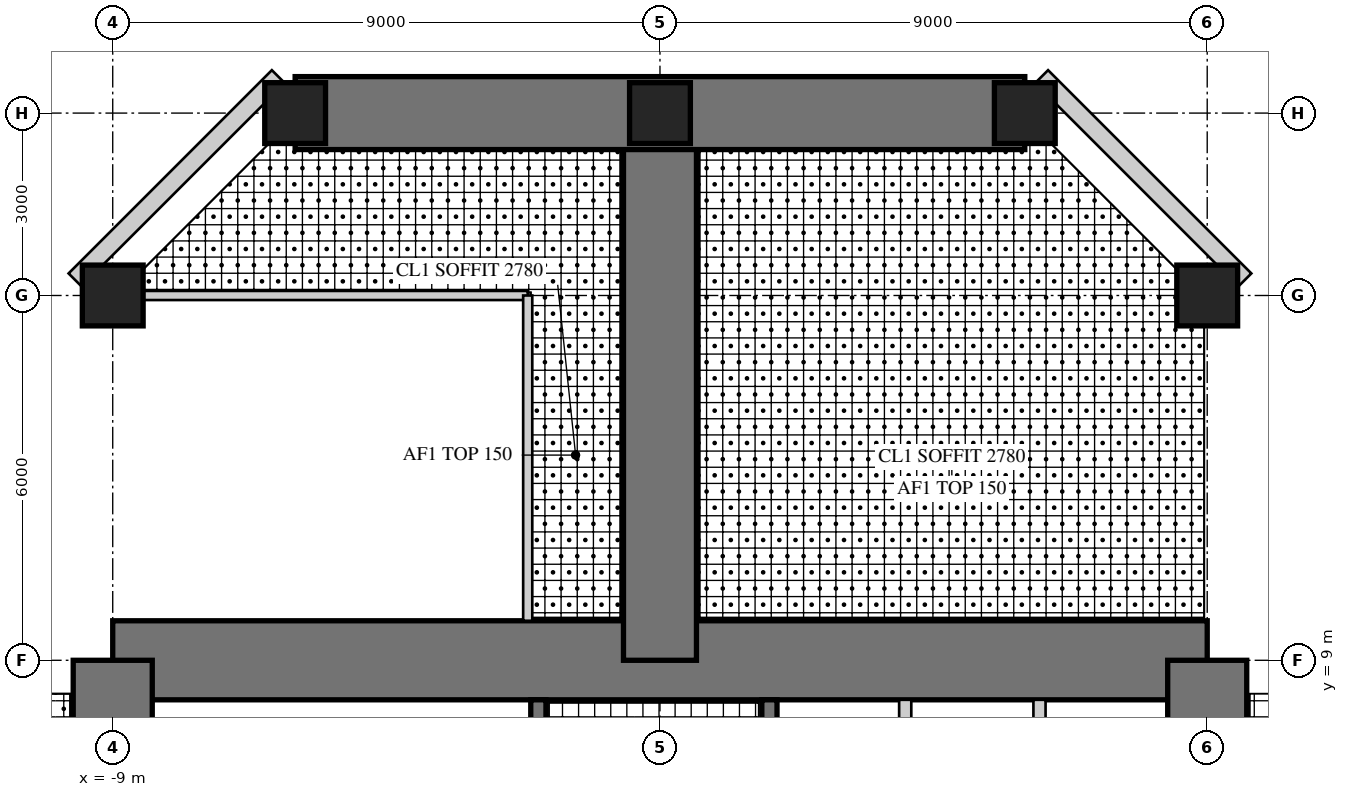
"""IFC4 building model, lengths in metres.
Left out: names, types, materials, properties, quantities, classifications, styles, units other than length and angle.
Written with IfcOpenShell. Run it as: python <this file> out.ifc"""

import sys

from ifc_helpers import new_model, si_unit, direction, frame, frame_2d, origin, origin_2d, place, context, subcontext, project, spatial, rectangle, hollow_rectangle, extrude, element, fill, save


model = new_model("IFC4")
c1 = context("Model", 3, precision=1e-05, world=origin(), true_north=direction((0.0, 1.0)))
c2 = subcontext(c1, "Body", "Model", "MODEL_VIEW")
j1 = project(units=[si_unit("LENGTHUNIT", "METRE"), si_unit("PLANEANGLEUNIT", "RADIAN")], contexts=[c1])
p1 = place(None, origin())
s1 = spatial("IfcSite", under=j1, at=p1, CompositionType="ELEMENT")
p2 = place(p1, origin())
s2 = spatial("IfcBuilding", under=s1, at=p2, CompositionType="ELEMENT")
p3 = place(p2, frame((0.0, 0.0, 124.5)))
s3 = spatial("IfcBuildingStorey", under=s2, at=p3, CompositionType="ELEMENT", Elevation=124.5)
p4 = place(p3, frame((9.0, 9.0, 0.0), z_axis=(0.0, 0.0, 1.0), x_axis=(-1.0, 0.0, 0.0)))
e1 = element("IfcWall", 1, at=p4, inside=s3, PredefinedType="SHEAR", context=c2, shape_type="SweptSolid", body=[
    extrude(rectangle(XDim=18.0, YDim=1.3, at=frame_2d((9.0, 0.0))), origin(), (0.0, 0.0, 1.0), 4.0),
])
p5 = place(p4, frame((9.8, 0.0, 0.0)))
e2 = element("IfcOpeningElement", 2, at=p5, cuts=e1, PredefinedType="OPENING", context=c2, shape_type="SweptSolid", body=[
    extrude(rectangle(XDim=1.0, YDim=2.4, at=frame_2d((0.5, 1.2))), frame((0.0, 0.66, 0.0), z_axis=(0.0, -1.0, 0.0), x_axis=(1.0, 0.0, 0.0)), (0.0, 0.0, 1.0), 1.32),
])
p6 = place(p3, frame((9.0, -9.0, 0.0), z_axis=(0.0, 0.0, 1.0), x_axis=(0.0, 1.0, 0.0)))
e3 = element("IfcWall", 3, at=p6, inside=s3, PredefinedType="SHEAR", context=c2, shape_type="SweptSolid", body=[
    extrude(rectangle(XDim=18.0, YDim=1.3, at=frame_2d((9.0, 0.0))), origin(), (0.0, 0.0, 1.0), 4.0),
])
p7 = place(p6, frame((9.8, 0.0, 0.0)))
e4 = element("IfcOpeningElement", 4, at=p7, cuts=e3, PredefinedType="OPENING", context=c2, shape_type="SweptSolid", body=[
    extrude(rectangle(XDim=1.0, YDim=2.4, at=frame_2d((0.5, 1.2))), frame((0.0, 0.66, 0.0), z_axis=(0.0, -1.0, 0.0), x_axis=(1.0, 0.0, 0.0)), (0.0, 0.0, 1.0), 1.32),
])
p8 = place(p3, frame((-9.0, 9.0, 0.0), z_axis=(0.0, 0.0, 1.0), x_axis=(0.0, -1.0, 0.0)))
e5 = element("IfcWall", 5, at=p8, inside=s3, PredefinedType="SHEAR", context=c2, shape_type="SweptSolid", body=[
    extrude(rectangle(XDim=18.0, YDim=1.3, at=frame_2d((9.0, 0.0))), origin(), (0.0, 0.0, 1.0), 4.0),
])
p9 = place(p8, frame((9.8, 0.0, 0.0)))
e6 = element("IfcOpeningElement", 6, at=p9, cuts=e5, PredefinedType="OPENING", context=c2, shape_type="SweptSolid", body=[
    extrude(rectangle(XDim=1.0, YDim=2.4, at=frame_2d((0.5, 1.2))), frame((0.0, 0.66, 0.0), z_axis=(0.0, -1.0, 0.0), x_axis=(1.0, 0.0, 0.0)), (0.0, 0.0, 1.0), 1.32),
])
p10 = place(p3, frame((1.8, 1.875, 0.0), z_axis=(0.0, 0.0, 1.0), x_axis=(0.0, 1.0, 0.0)))
e7 = element("IfcWall", 7, at=p10, inside=s3, PredefinedType="SHEAR", context=c2, shape_type="SweptSolid", body=[
    extrude(rectangle(XDim=6.475, YDim=0.25, at=frame_2d((3.238, 0.0))), origin(), (0.0, 0.0, 1.0), 4.0),
])
p11 = place(p10, frame((1.875, 0.0, 0.0)))
e8 = element("IfcOpeningElement", 8, at=p11, cuts=e7, PredefinedType="OPENING", context=c2, shape_type="SweptSolid", body=[
    extrude(rectangle(XDim=1.6, YDim=2.4, at=frame_2d((0.8, 1.2))), frame((0.0, 0.135, 0.0), z_axis=(0.0, -1.0, 0.0), x_axis=(1.0, 0.0, 0.0)), (0.0, 0.0, 1.0), 0.27),
])
for number, where, z_axis, x_axis in (
    (9, (4.033, 5.975, 0.0), (0.0, 0.0, 1.0), (0.0, 1.0, 0.0)),
    (10, (6.242, 5.975, 0.0), (0.0, 0.0, 1.0), (0.0, 1.0, 0.0)),
):
    element("IfcWall", number, at=place(p3, frame(where, z_axis=z_axis, x_axis=x_axis)), inside=s3, PredefinedType="PARTITIONING", context=c2, shape_type="SweptSolid", body=[
        extrude(rectangle(XDim=2.375, YDim=0.2, at=frame_2d((1.188, 0.0))), origin(), (0.0, 0.0, 1.0), 4.0),
    ])
p12 = place(p3, frame((-2.0, 1.675, 0.0), z_axis=(0.0, 0.0, 1.0), x_axis=(0.0, 1.0, 0.0)))
e11 = element("IfcWall", 11, at=p12, inside=s3, PredefinedType="SHEAR", context=c2, shape_type="SweptSolid", body=[
    extrude(rectangle(XDim=6.675, YDim=0.25, at=frame_2d((3.337, 0.0))), origin(), (0.0, 0.0, 1.0), 4.0),
])
p13 = place(p12, frame((0.725, 0.0, 0.0)))
e12 = element("IfcOpeningElement", 12, at=p13, cuts=e11, PredefinedType="OPENING", context=c2, shape_type="SweptSolid", body=[
    extrude(rectangle(XDim=1.0, YDim=2.1, at=frame_2d((0.5, 1.05))), frame((0.0, 0.135, 0.0), z_axis=(0.0, -1.0, 0.0), x_axis=(1.0, 0.0, 0.0)), (0.0, 0.0, 1.0), 0.27),
])
p14 = place(p3, frame((0.0, 9.0, 0.0), z_axis=(0.0, 0.0, 1.0), x_axis=(0.0, 1.0, 0.0)))
e13 = element("IfcWall", 13, at=p14, inside=s3, PredefinedType="SHEAR", context=c2, shape_type="SweptSolid", body=[
    extrude(rectangle(XDim=9.0, YDim=1.2, at=frame_2d((4.5, 0.0))), origin(), (0.0, 0.0, 1.0), 4.0),
])
p15 = place(p14, frame((4.3, 0.0, 0.0)))
e14 = element("IfcOpeningElement", 14, at=p15, cuts=e13, PredefinedType="OPENING", context=c2, shape_type="SweptSolid", body=[
    extrude(rectangle(XDim=1.0, YDim=2.2, at=frame_2d((0.5, 1.1))), frame((0.0, 0.61, 0.0), z_axis=(0.0, -1.0, 0.0), x_axis=(1.0, 0.0, 0.0)), (0.0, 0.0, 1.0), 1.22),
])
p16 = place(p3, frame((6.0, 18.0, 0.0), z_axis=(0.0, 0.0, 1.0), x_axis=(-1.0, 0.0, 0.0)))
e15 = element("IfcWall", 15, at=p16, inside=s3, PredefinedType="SHEAR", context=c2, shape_type="SweptSolid", body=[
    extrude(rectangle(XDim=12.0, YDim=1.2, at=frame_2d((6.0, 0.0))), origin(), (0.0, 0.0, 1.0), 4.0),
])
p17 = place(p16, frame((1.55, 0.0, 0.6)))
e16 = element("IfcOpeningElement", 16, at=p17, cuts=e15, PredefinedType="OPENING", context=c2, shape_type="SweptSolid", body=[
    extrude(rectangle(XDim=3.0, YDim=2.4, at=frame_2d((1.5, 1.2))), frame((0.0, 0.61, 0.0), z_axis=(0.0, -1.0, 0.0), x_axis=(1.0, 0.0, 0.0)), (0.0, 0.0, 1.0), 1.22),
])
p18 = place(p16, frame((7.45, 0.0, 0.6)))
e17 = element("IfcOpeningElement", 17, at=p18, cuts=e15, PredefinedType="OPENING", context=c2, shape_type="SweptSolid", body=[
    extrude(rectangle(XDim=3.0, YDim=2.4, at=frame_2d((1.5, 1.2))), frame((0.0, 0.61, 0.0), z_axis=(0.0, -1.0, 0.0), x_axis=(1.0, 0.0, 0.0)), (0.0, 0.0, 1.0), 1.22),
])
for number, where, z_axis, x_axis in (
    (18, (9.0, 15.0, 0.0), (0.0, 0.0, 1.0), (1.0, 0.0, 0.0)),
    (19, (-9.0, 15.0, 0.0), (0.0, 0.0, 1.0), (1.0, 0.0, 0.0)),
    (20, (6.0, 18.0, 0.0), (0.0, 0.0, 1.0), (1.0, 0.0, 0.0)),
    (21, (0.0, 18.0, 0.0), (0.0, 0.0, 1.0), (1.0, 0.0, 0.0)),
    (22, (-6.0, 18.0, 0.0), (0.0, 0.0, 1.0), (1.0, 0.0, 0.0)),
):
    element("IfcColumn", number, at=place(p3, frame(where, z_axis=z_axis, x_axis=x_axis)), inside=s3, PredefinedType="COLUMN", context=c2, shape_type="SweptSolid", body=[
        extrude(rectangle(XDim=1.0, YDim=1.0, at=origin_2d()), origin(), (0.0, 0.0, 1.0), 4.0),
    ])
p19 = place(p3, frame((9.62, 15.257, 0.0), z_axis=(0.0, 0.0, 1.0), x_axis=(-0.707106781187, 0.707106781187, 0.0)))
e23 = element("IfcWall", 23, at=p19, inside=s3, PredefinedType="SOLIDWALL", context=c2, shape_type="SweptSolid", body=[
    extrude(rectangle(XDim=4.728, YDim=0.3, at=frame_2d((2.364, 0.0))), origin(), (0.0, 0.0, 1.0), 3.8),
])
p20 = place(p19, frame((1.914, 0.0, 0.3)))
e24 = element("IfcOpeningElement", 24, at=p20, cuts=e23, PredefinedType="OPENING", context=c2, shape_type="SweptSolid", body=[
    extrude(rectangle(XDim=0.9, YDim=2.4, at=frame_2d((0.45, 1.2))), frame((0.0, 0.16, 0.0), z_axis=(0.0, -1.0, 0.0), x_axis=(1.0, 0.0, 0.0)), (0.0, 0.0, 1.0), 0.32),
])
p21 = place(p3, frame((-6.277, 18.6, 0.0), z_axis=(0.0, 0.0, 1.0), x_axis=(-0.707106781187, -0.707106781187, 0.0)))
e25 = element("IfcWall", 25, at=p21, inside=s3, PredefinedType="SOLIDWALL", context=c2, shape_type="SweptSolid", body=[
    extrude(rectangle(XDim=4.728, YDim=0.3, at=frame_2d((2.364, 0.0))), origin(), (0.0, 0.0, 1.0), 3.8),
])
p22 = place(p21, frame((1.914, 0.0, 0.3)))
e26 = element("IfcOpeningElement", 26, at=p22, cuts=e25, PredefinedType="OPENING", context=c2, shape_type="SweptSolid", body=[
    extrude(rectangle(XDim=0.9, YDim=2.4, at=frame_2d((0.45, 1.2))), frame((0.0, 0.16, 0.0), z_axis=(0.0, -1.0, 0.0), x_axis=(1.0, 0.0, 0.0)), (0.0, 0.0, 1.0), 0.32),
])
p23 = place(p3, frame((-2.175, 15.0, 0.0), z_axis=(0.0, 0.0, 1.0), x_axis=(-1.0, 0.0, 0.0)))
e27 = element("IfcWall", 27, at=p23, inside=s3, PredefinedType="PARTITIONING", context=c2, shape_type="SweptSolid", body=[
    extrude(rectangle(XDim=6.325, YDim=0.15, at=frame_2d((3.163, 0.0))), origin(), (0.0, 0.0, 1.0), 3.0),
])
p24 = place(p23, frame((2.663, 0.0, 0.0)))
e28 = element("IfcOpeningElement", 28, at=p24, cuts=e27, PredefinedType="OPENING", context=c2, shape_type="SweptSolid", body=[
    extrude(rectangle(XDim=1.0, YDim=2.1, at=frame_2d((0.5, 1.05))), frame((0.0, 0.085, 0.0), z_axis=(0.0, -1.0, 0.0), x_axis=(1.0, 0.0, 0.0)), (0.0, 0.0, 1.0), 0.17),
])
p25 = place(p3, frame((-2.175, 9.65, 0.0), z_axis=(0.0, 0.0, 1.0), x_axis=(0.0, 1.0, 0.0)))
e29 = element("IfcWall", 29, at=p25, inside=s3, PredefinedType="PARTITIONING", context=c2, shape_type="SweptSolid", body=[
    extrude(rectangle(XDim=5.35, YDim=0.15, at=frame_2d((2.675, 0.0))), origin(), (0.0, 0.0, 1.0), 3.8),
])
p26 = place(p20, origin())
e30 = element("IfcWindow", 30, at=p26, inside=s3, PartitioningType="SINGLE_PANEL", PredefinedType="WINDOW", context=c2, shape_type="SweptSolid", body=[
    extrude(hollow_rectangle(XDim=0.9, YDim=2.4, WallThickness=0.06, at=frame_2d((0.45, 1.2))), frame((0.0, 0.03, 0.0), z_axis=(0.0, -1.0, 0.0), x_axis=(1.0, 0.0, 0.0)), (0.0, 0.0, 1.0), 0.06),
    extrude(rectangle(XDim=0.779, YDim=2.279, at=frame_2d((0.45, 1.2))), frame((0.0, 0.03, 0.0), z_axis=(0.0, -1.0, 0.0), x_axis=(1.0, 0.0, 0.0)), (0.0, 0.0, 1.0), 0.06),
])
fill(e24, e30)
p27 = place(p17, origin())
e31 = element("IfcWindow", 31, at=p27, inside=s3, PartitioningType="SINGLE_PANEL", PredefinedType="WINDOW", context=c2, shape_type="SweptSolid", body=[
    extrude(hollow_rectangle(XDim=3.0, YDim=2.4, WallThickness=0.06, at=frame_2d((1.5, 1.2))), frame((0.0, 0.03, 0.0), z_axis=(0.0, -1.0, 0.0), x_axis=(1.0, 0.0, 0.0)), (0.0, 0.0, 1.0), 0.06),
    extrude(rectangle(XDim=2.879, YDim=2.279, at=frame_2d((1.5, 1.2))), frame((0.0, 0.03, 0.0), z_axis=(0.0, -1.0, 0.0), x_axis=(1.0, 0.0, 0.0)), (0.0, 0.0, 1.0), 0.06),
])
fill(e16, e31)
p28 = place(p18, origin())
e32 = element("IfcWindow", 32, at=p28, inside=s3, PartitioningType="SINGLE_PANEL", PredefinedType="WINDOW", context=c2, shape_type="SweptSolid", body=[
    extrude(hollow_rectangle(XDim=3.0, YDim=2.4, WallThickness=0.06, at=frame_2d((1.5, 1.2))), frame((0.0, 0.03, 0.0), z_axis=(0.0, -1.0, 0.0), x_axis=(1.0, 0.0, 0.0)), (0.0, 0.0, 1.0), 0.06),
    extrude(rectangle(XDim=2.879, YDim=2.279, at=frame_2d((1.5, 1.2))), frame((0.0, 0.03, 0.0), z_axis=(0.0, -1.0, 0.0), x_axis=(1.0, 0.0, 0.0)), (0.0, 0.0, 1.0), 0.06),
])
fill(e17, e32)
p29 = place(p22, origin())
e33 = element("IfcWindow", 33, at=p29, inside=s3, PartitioningType="SINGLE_PANEL", PredefinedType="WINDOW", context=c2, shape_type="SweptSolid", body=[
    extrude(hollow_rectangle(XDim=0.9, YDim=2.4, WallThickness=0.06, at=frame_2d((0.45, 1.2))), frame((0.0, 0.03, 0.0), z_axis=(0.0, -1.0, 0.0), x_axis=(1.0, 0.0, 0.0)), (0.0, 0.0, 1.0), 0.06),
    extrude(rectangle(XDim=0.779, YDim=2.279, at=frame_2d((0.45, 1.2))), frame((0.0, 0.03, 0.0), z_axis=(0.0, -1.0, 0.0), x_axis=(1.0, 0.0, 0.0)), (0.0, 0.0, 1.0), 0.06),
])
fill(e26, e33)
p30 = place(p24, frame((1.0, 0.0, 0.0), z_axis=(0.0, 0.0, 1.0), x_axis=(-1.0, 0.0, 0.0)))
e34 = element("IfcDoor", 34, at=p30, inside=s3, OperationType="SINGLE_SWING_LEFT", PredefinedType="DOOR", context=c2, shape_type="SweptSolid", body=[
    extrude(rectangle(XDim=1.0, YDim=2.1, at=frame_2d((0.5, 1.05))), frame((0.0, 0.025, 0.0), z_axis=(0.0, -1.0, 0.0), x_axis=(1.0, 0.0, 0.0)), (0.0, 0.0, 1.0), 0.05),
])
fill(e28, e34)
p31 = place(p15, origin())
e35 = element("IfcDoor", 35, at=p31, inside=s3, OperationType="SINGLE_SWING_RIGHT", PredefinedType="DOOR", context=c2, shape_type="SweptSolid", body=[
    extrude(rectangle(XDim=1.0, YDim=2.2, at=frame_2d((0.5, 1.1))), frame((0.0, 0.025, 0.0), z_axis=(0.0, -1.0, 0.0), x_axis=(1.0, 0.0, 0.0)), (0.0, 0.0, 1.0), 0.05),
])
fill(e14, e35)
p32 = place(p5, frame((1.0, 0.0, 0.0), z_axis=(0.0, 0.0, 1.0), x_axis=(-1.0, 0.0, 0.0)))
e36 = element("IfcDoor", 36, at=p32, inside=s3, OperationType="SINGLE_SWING_RIGHT", PredefinedType="DOOR", context=c2, shape_type="SweptSolid", body=[
    extrude(rectangle(XDim=1.0, YDim=2.4, at=frame_2d((0.5, 1.2))), frame((0.0, -0.005, 0.0), z_axis=(0.0, -1.0, 0.0), x_axis=(1.0, 0.0, 0.0)), (0.0, 0.0, 1.0), 0.05),
])
fill(e2, e36)
save(model, sys.argv[1])
